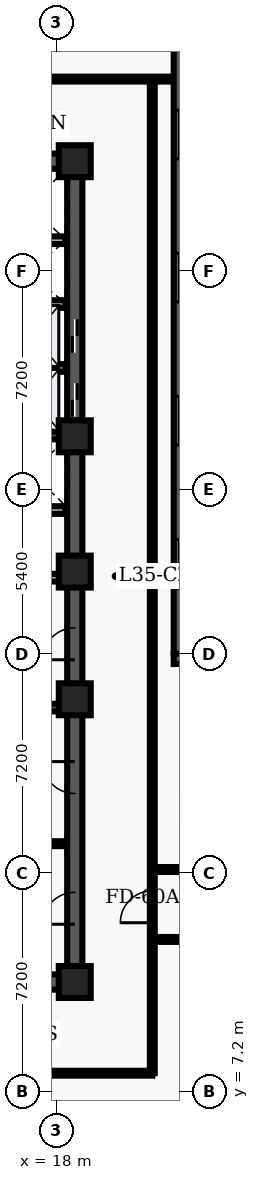
"""IFC4 building model, lengths in metres.
Left out: names, types, materials, properties, quantities, classifications, styles, units other than length and angle.
Written with IfcOpenShell. Run it as: python <this file> out.ifc"""

import sys

from ifc_helpers import new_model, entity, si_unit, converted_unit, direction, frame, origin_with_axes, origin_2d_with_axis, place, context, subcontext, project, spatial, polyline, rectangle, outline, extrude, element, fill, save


model = new_model("IFC4")
c1 = context("Model", 3, precision=1e-05, world=origin_with_axes(), true_north=direction((0.0, 1.0)))
c2 = subcontext(c1, "Body", "Model", "MODEL_VIEW")
j1 = project(units=[si_unit("LENGTHUNIT", "METRE"), converted_unit("PLANEANGLEUNIT", "DEGREE", entity("IfcPlaneAngleMeasure", 0.017), si_unit("PLANEANGLEUNIT", "RADIAN"), dimensions=[0, 0, 0, 0, 0, 0, 0])], contexts=[c1])
p1 = place(None, origin_with_axes())
s1 = spatial("IfcSite", under=j1, at=p1, CompositionType="ELEMENT")
p2 = place(p1, origin_with_axes())
s2 = spatial("IfcBuilding", under=s1, at=p2, CompositionType="ELEMENT")
p3 = place(p2, frame((0.0, 0.0, 144.6), z_axis=(0.0, 0.0, 1.0), x_axis=(1.0, 0.0, 0.0)))
s3 = spatial("IfcBuildingStorey", under=s2, at=p3, CompositionType="ELEMENT", Elevation=144.6)
p4 = place(p3, frame((11.4, 10.8, 0.0), z_axis=(0.0, 0.0, 1.0), x_axis=(1.0, 0.0, 0.0)))
e1 = element("IfcWall", 1, at=p4, inside=s3, PredefinedType="SHEAR", context=c2, shape_type="SweptSolid", body=[
    extrude(outline(polyline([(0.0, -0.25), (7.2, -0.25), (7.2, 0.25), (0.0, 0.25), (0.0, -0.25)])), origin_with_axes(), (0.0, 0.0, 1.0), 3.66),
])
p5 = place(p4, frame((2.625, 0.0, 0.0), z_axis=(0.0, 0.0, 1.0), x_axis=(1.0, 0.0, 0.0)))
e2 = element("IfcOpeningElement", 2, at=p5, cuts=e1, PredefinedType="OPENING", context=c2, shape_type="SweptSolid", body=[
    extrude(rectangle(XDim=1.05, YDim=0.52, at=origin_2d_with_axis()), origin_with_axes(), (0.0, 0.0, 1.0), 2.15),
])
p6 = place(p3, frame((11.4, 37.8, 0.0), z_axis=(0.0, 0.0, 1.0), x_axis=(1.0, 0.0, 0.0)))
e3 = element("IfcWall", 3, at=p6, inside=s3, PredefinedType="SHEAR", context=c2, shape_type="SweptSolid", body=[
    extrude(outline(polyline([(0.0, -0.25), (7.2, -0.25), (7.2, 0.25), (0.0, 0.25), (0.0, -0.25)])), origin_with_axes(), (0.0, 0.0, 1.0), 3.66),
])
p7 = place(p6, frame((2.625, 0.0, 0.0), z_axis=(0.0, 0.0, 1.0), x_axis=(1.0, 0.0, 0.0)))
e4 = element("IfcOpeningElement", 4, at=p7, cuts=e3, PredefinedType="OPENING", context=c2, shape_type="SweptSolid", body=[
    extrude(rectangle(XDim=1.05, YDim=0.52, at=origin_2d_with_axis()), origin_with_axes(), (0.0, 0.0, 1.0), 2.15),
])
p8 = place(p3, frame((18.6, 10.8, 0.0), z_axis=(0.0, 0.0, 1.0), x_axis=(0.0, 1.0, 0.0)))
e5 = element("IfcWall", 5, at=p8, inside=s3, PredefinedType="SHEAR", context=c2, shape_type="SweptSolid", body=[
    extrude(outline(polyline([(0.0, -0.25), (13.5, -0.25), (13.5, 0.25), (0.0, 0.25), (0.0, -0.25)])), origin_with_axes(), (0.0, 0.0, 1.0), 3.66),
])
p9 = place(p8, frame((11.125, 0.0, 0.0), z_axis=(0.0, 0.0, 1.0), x_axis=(1.0, 0.0, 0.0)))
e6 = element("IfcOpeningElement", 6, at=p9, cuts=e5, PredefinedType="OPENING", context=c2, shape_type="SweptSolid", body=[
    extrude(rectangle(XDim=1.05, YDim=0.52, at=origin_2d_with_axis()), origin_with_axes(), (0.0, 0.0, 1.0), 2.15),
])
p10 = place(p8, frame((2.425, 0.0, 0.0), z_axis=(0.0, 0.0, 1.0), x_axis=(1.0, 0.0, 0.0)))
e7 = element("IfcOpeningElement", 7, at=p10, cuts=e5, PredefinedType="OPENING", context=c2, shape_type="SweptSolid", body=[
    extrude(rectangle(XDim=1.05, YDim=0.52, at=origin_2d_with_axis()), origin_with_axes(), (0.0, 0.0, 1.0), 2.15),
])
p11 = place(p8, frame((6.725, 0.0, 0.0), z_axis=(0.0, 0.0, 1.0), x_axis=(1.0, 0.0, 0.0)))
e8 = element("IfcOpeningElement", 8, at=p11, cuts=e5, PredefinedType="OPENING", context=c2, shape_type="SweptSolid", body=[
    extrude(rectangle(XDim=1.05, YDim=0.52, at=origin_2d_with_axis()), origin_with_axes(), (0.0, 0.0, 1.0), 2.15),
])
p12 = place(p3, frame((18.6, 24.3, 0.0), z_axis=(0.0, 0.0, 1.0), x_axis=(0.0, 1.0, 0.0)))
e9 = element("IfcWall", 9, at=p12, inside=s3, PredefinedType="SHEAR", context=c2, shape_type="SweptSolid", body=[
    extrude(outline(polyline([(0.0, -0.25), (13.5, -0.25), (13.5, 0.25), (0.0, 0.25), (0.0, -0.25)])), origin_with_axes(), (0.0, 0.0, 1.0), 3.66),
])
p13 = place(p12, frame((5.65, 0.0, 0.0), z_axis=(0.0, 0.0, 1.0), x_axis=(1.0, 0.0, 0.0)))
e10 = element("IfcOpeningElement", 10, at=p13, cuts=e9, PredefinedType="OPENING", context=c2, shape_type="SweptSolid", body=[
    extrude(rectangle(XDim=1.1, YDim=0.52, at=origin_2d_with_axis()), origin_with_axes(), (0.0, 0.0, 1.0), 2.15),
])
p14 = place(p12, frame((7.75, 0.0, 0.0), z_axis=(0.0, 0.0, 1.0), x_axis=(1.0, 0.0, 0.0)))
e11 = element("IfcOpeningElement", 11, at=p14, cuts=e9, PredefinedType="OPENING", context=c2, shape_type="SweptSolid", body=[
    extrude(rectangle(XDim=1.1, YDim=0.52, at=origin_2d_with_axis()), origin_with_axes(), (0.0, 0.0, 1.0), 2.15),
])
for number, where, z_axis, x_axis in (
    (12, (11.65, 19.825, 0.0), (0.0, 0.0, 1.0), (1.0, 0.0, 0.0)),
    (13, (11.65, 28.775, 0.0), (0.0, 0.0, 1.0), (1.0, 0.0, 0.0)),
):
    element("IfcWall", number, at=place(p3, frame(where, z_axis=z_axis, x_axis=x_axis)), inside=s3, PredefinedType="SHEAR", context=c2, shape_type="SweptSolid", body=[
        extrude(outline(polyline([(0.0, -0.125), (6.7, -0.125), (6.7, 0.125), (0.0, 0.125), (0.0, -0.125)])), origin_with_axes(), (0.0, 0.0, 1.0), 3.66),
    ])
p15 = place(p3, frame((11.7, 24.1, 0.0), z_axis=(0.0, 0.0, 1.0), x_axis=(1.0, 0.0, 0.0)))
e14 = element("IfcWall", 14, at=p15, inside=s3, PredefinedType="SOLIDWALL", context=c2, shape_type="SweptSolid", body=[
    extrude(outline(polyline([(0.0, -0.125), (6.6, -0.125), (6.6, 0.125), (0.0, 0.125), (0.0, -0.125)])), origin_with_axes(), (0.0, 0.0, 1.0), 2.7),
])
p16 = place(p15, frame((3.6, 0.0, 0.0), z_axis=(0.0, 0.0, 1.0), x_axis=(1.0, 0.0, 0.0)))
e15 = element("IfcOpeningElement", 15, at=p16, cuts=e14, PredefinedType="OPENING", context=c2, shape_type="SweptSolid", body=[
    extrude(rectangle(XDim=0.9, YDim=0.27, at=origin_2d_with_axis()), origin_with_axes(), (0.0, 0.0, 1.0), 2.15),
])
p17 = place(p15, frame((5.65, 0.0, 0.0), z_axis=(0.0, 0.0, 1.0), x_axis=(1.0, 0.0, 0.0)))
e16 = element("IfcOpeningElement", 16, at=p17, cuts=e14, PredefinedType="OPENING", context=c2, shape_type="SweptSolid", body=[
    extrude(rectangle(XDim=0.9, YDim=0.27, at=origin_2d_with_axis()), origin_with_axes(), (0.0, 0.0, 1.0), 2.15),
])
p18 = place(p3, frame((11.7, 26.325, 0.0), z_axis=(0.0, 0.0, 1.0), x_axis=(1.0, 0.0, 0.0)))
e17 = element("IfcWall", 17, at=p18, inside=s3, PredefinedType="SOLIDWALL", context=c2, shape_type="SweptSolid", body=[
    extrude(outline(polyline([(0.0, -0.125), (6.6, -0.125), (6.6, 0.125), (0.0, 0.125), (0.0, -0.125)])), origin_with_axes(), (0.0, 0.0, 1.0), 2.7),
])
p19 = place(p18, frame((3.5, 0.0, 0.0), z_axis=(0.0, 0.0, 1.0), x_axis=(1.0, 0.0, 0.0)))
e18 = element("IfcOpeningElement", 18, at=p19, cuts=e17, PredefinedType="OPENING", context=c2, shape_type="SweptSolid", body=[
    extrude(rectangle(XDim=0.9, YDim=0.27, at=origin_2d_with_axis()), origin_with_axes(), (0.0, 0.0, 1.0), 2.15),
])
for number, where, z_axis, x_axis in (
    (19, (18.6, 10.8, 0.0), (0.0, 0.0, 1.0), (1.0, 0.0, 0.0)),
    (20, (18.6, 20.1, 0.0), (0.0, 0.0, 1.0), (1.0, 0.0, 0.0)),
    (21, (18.6, 24.3, 0.0), (0.0, 0.0, 1.0), (1.0, 0.0, 0.0)),
    (22, (18.6, 28.75, 0.0), (0.0, 0.0, 1.0), (1.0, 0.0, 0.0)),
    (23, (18.6, 37.8, 0.0), (0.0, 0.0, 1.0), (1.0, 0.0, 0.0)),
):
    element("IfcColumn", number, at=place(p3, frame(where, z_axis=z_axis, x_axis=x_axis)), inside=s3, PredefinedType="COLUMN", context=c2, shape_type="SweptSolid", body=[
        extrude(rectangle(XDim=1.05, YDim=1.05, at=origin_2d_with_axis()), origin_with_axes(), (0.0, 0.0, 1.0), 3.9),
    ])
p20 = place(p3, frame((15.84, 15.35, 0.0), z_axis=(0.0, 0.0, 1.0), x_axis=(1.0, 0.0, 0.0)))
e24 = element("IfcWall", 24, at=p20, inside=s3, PredefinedType="PARTITIONING", context=c2, shape_type="SweptSolid", body=[
    extrude(outline(polyline([(0.0, -0.08), (2.46, -0.08), (2.46, 0.08), (0.0, 0.08), (0.0, -0.08)])), origin_with_axes(), (0.0, 0.0, 1.0), 2.7),
])
for number, where, z_axis, x_axis in (
    (25, (15.84, 31.0, 0.0), (0.0, 0.0, 1.0), (1.0, 0.0, 0.0)),
    (26, (15.84, 33.1, 0.0), (0.0, 0.0, 1.0), (1.0, 0.0, 0.0)),
    (27, (15.84, 35.2, 0.0), (0.0, 0.0, 1.0), (1.0, 0.0, 0.0)),
):
    element("IfcWall", number, at=place(p3, frame(where, z_axis=z_axis, x_axis=x_axis)), inside=s3, PredefinedType="SOLIDWALL", context=c2, shape_type="SweptSolid", body=[
        extrude(outline(polyline([(0.0, -0.125), (2.46, -0.125), (2.46, 0.125), (0.0, 0.125), (0.0, -0.125)])), origin_with_axes(), (0.0, 0.0, 1.0), 2.7),
    ])
p21 = place(p3, frame((2.6, 7.8, 0.0), z_axis=(0.0, 0.0, 1.0), x_axis=(1.0, 0.0, 0.0)))
e28 = element("IfcWall", 28, at=p21, inside=s3, PredefinedType="PARTITIONING", context=c2, shape_type="SweptSolid", body=[
    extrude(outline(polyline([(0.0, -0.08), (18.55, -0.08), (18.55, 0.08), (0.0, 0.08), (0.0, -0.08)])), origin_with_axes(), (0.0, 0.0, 1.0), 2.7),
])
p22 = place(p21, frame((9.245, 0.0, 0.0), z_axis=(0.0, 0.0, 1.0), x_axis=(1.0, 0.0, 0.0)))
e29 = element("IfcOpeningElement", 29, at=p22, cuts=e28, PredefinedType="OPENING", context=c2, shape_type="SweptSolid", body=[
    extrude(rectangle(XDim=1.2, YDim=0.18, at=origin_2d_with_axis()), origin_with_axes(), (0.0, 0.0, 1.0), 2.2),
])
p23 = place(p3, frame((2.6, 40.5, 0.0), z_axis=(0.0, 0.0, 1.0), x_axis=(1.0, 0.0, 0.0)))
e30 = element("IfcWall", 30, at=p23, inside=s3, PredefinedType="PARTITIONING", context=c2, shape_type="SweptSolid", body=[
    extrude(outline(polyline([(0.0, -0.08), (19.26, -0.08), (19.26, 0.08), (0.0, 0.08), (0.0, -0.08)])), origin_with_axes(), (0.0, 0.0, 1.0), 2.7),
])
p24 = place(p23, frame((1.084, 0.0, 0.0), z_axis=(0.0, 0.0, 1.0), x_axis=(1.0, 0.0, 0.0)))
e31 = element("IfcOpeningElement", 31, at=p24, cuts=e30, PredefinedType="OPENING", context=c2, shape_type="SweptSolid", body=[
    extrude(rectangle(XDim=1.0, YDim=0.18, at=origin_2d_with_axis()), origin_with_axes(), (0.0, 0.0, 1.0), 2.15),
])
p25 = place(p23, frame((6.049, 0.0, 0.0), z_axis=(0.0, 0.0, 1.0), x_axis=(1.0, 0.0, 0.0)))
e32 = element("IfcOpeningElement", 32, at=p25, cuts=e30, PredefinedType="OPENING", context=c2, shape_type="SweptSolid", body=[
    extrude(rectangle(XDim=1.0, YDim=0.18, at=origin_2d_with_axis()), origin_with_axes(), (0.0, 0.0, 1.0), 2.15),
])
p26 = place(p23, frame((9.968, 0.0, 0.0), z_axis=(0.0, 0.0, 1.0), x_axis=(1.0, 0.0, 0.0)))
e33 = element("IfcOpeningElement", 33, at=p26, cuts=e30, PredefinedType="OPENING", context=c2, shape_type="SweptSolid", body=[
    extrude(rectangle(XDim=1.0, YDim=0.18, at=origin_2d_with_axis()), origin_with_axes(), (0.0, 0.0, 1.0), 2.15),
])
p27 = place(p23, frame((13.601, 0.0, 0.0), z_axis=(0.0, 0.0, 1.0), x_axis=(1.0, 0.0, 0.0)))
e34 = element("IfcOpeningElement", 34, at=p27, cuts=e30, PredefinedType="OPENING", context=c2, shape_type="SweptSolid", body=[
    extrude(rectangle(XDim=1.2, YDim=0.18, at=origin_2d_with_axis()), origin_with_axes(), (0.0, 0.0, 1.0), 2.2),
])
p28 = place(p3, frame((21.15, 7.8, 0.0), z_axis=(0.0, 0.0, 1.0), x_axis=(0.0, 1.0, 0.0)))
e35 = element("IfcWall", 35, at=p28, inside=s3, PredefinedType="PARTITIONING", context=c2, shape_type="SweptSolid", body=[
    extrude(outline(polyline([(0.0, -0.08), (32.7, -0.08), (32.7, 0.08), (0.0, 0.08), (0.0, -0.08)])), origin_with_axes(), (0.0, 0.0, 1.0), 2.7),
])
p29 = place(p28, frame((5.475, 0.0, 0.0), z_axis=(0.0, 0.0, 1.0), x_axis=(1.0, 0.0, 0.0)))
e36 = element("IfcOpeningElement", 36, at=p29, cuts=e35, PredefinedType="OPENING", context=c2, shape_type="SweptSolid", body=[
    extrude(rectangle(XDim=1.05, YDim=0.18, at=origin_2d_with_axis()), origin_with_axes(), (0.0, 0.0, 1.0), 2.15),
])
p30 = place(p3, frame((21.15, 12.2, 0.0), z_axis=(0.0, 0.0, 1.0), x_axis=(1.0, 0.0, 0.0)))
e37 = element("IfcWall", 37, at=p30, inside=s3, PredefinedType="PARTITIONING", context=c2, shape_type="SweptSolid", body=[
    extrude(outline(polyline([(0.0, -0.08), (15.2, -0.08), (15.2, 0.08), (0.0, 0.08), (0.0, -0.08)])), origin_with_axes(), (0.0, 0.0, 1.0), 2.7),
])
p31 = place(p30, frame((3.315, 0.0, 0.0), z_axis=(0.0, 0.0, 1.0), x_axis=(1.0, 0.0, 0.0)))
e38 = element("IfcOpeningElement", 38, at=p31, cuts=e37, PredefinedType="OPENING", context=c2, shape_type="SweptSolid", body=[
    extrude(rectangle(XDim=1.0, YDim=0.18, at=origin_2d_with_axis()), origin_with_axes(), (0.0, 0.0, 1.0), 2.15),
])
p32 = place(p30, frame((7.624, 0.0, 0.0), z_axis=(0.0, 0.0, 1.0), x_axis=(1.0, 0.0, 0.0)))
e39 = element("IfcOpeningElement", 39, at=p32, cuts=e37, PredefinedType="OPENING", context=c2, shape_type="SweptSolid", body=[
    extrude(rectangle(XDim=1.0, YDim=0.18, at=origin_2d_with_axis()), origin_with_axes(), (0.0, 0.0, 1.0), 2.15),
])
p33 = place(p30, frame((10.288, 0.0, 0.0), z_axis=(0.0, 0.0, 1.0), x_axis=(1.0, 0.0, 0.0)))
e40 = element("IfcOpeningElement", 40, at=p33, cuts=e37, PredefinedType="OPENING", context=c2, shape_type="SweptSolid", body=[
    extrude(rectangle(XDim=1.0, YDim=0.18, at=origin_2d_with_axis()), origin_with_axes(), (0.0, 0.0, 1.0), 2.15),
])
p34 = place(p30, frame((13.169, 0.0, 0.0), z_axis=(0.0, 0.0, 1.0), x_axis=(1.0, 0.0, 0.0)))
e41 = element("IfcOpeningElement", 41, at=p34, cuts=e37, PredefinedType="OPENING", context=c2, shape_type="SweptSolid", body=[
    extrude(rectangle(XDim=1.0, YDim=0.18, at=origin_2d_with_axis()), origin_with_axes(), (0.0, 0.0, 1.0), 2.15),
])
p35 = place(p3, frame((21.15, 14.5, 0.0), z_axis=(0.0, 0.0, 1.0), x_axis=(1.0, 0.0, 0.0)))
e42 = element("IfcWall", 42, at=p35, inside=s3, PredefinedType="PARTITIONING", context=c2, shape_type="SweptSolid", body=[
    extrude(outline(polyline([(0.0, -0.08), (15.2, -0.08), (15.2, 0.08), (0.0, 0.08), (0.0, -0.08)])), origin_with_axes(), (0.0, 0.0, 1.0), 2.7),
])
p36 = place(p35, frame((7.65, 0.0, 0.0), z_axis=(0.0, 0.0, 1.0), x_axis=(1.0, 0.0, 0.0)))
e43 = element("IfcOpeningElement", 43, at=p36, cuts=e42, PredefinedType="OPENING", context=c2, shape_type="SweptSolid", body=[
    extrude(rectangle(XDim=1.2, YDim=0.18, at=origin_2d_with_axis()), origin_with_axes(), (0.0, 0.0, 1.0), 2.2),
])
p37 = place(p3, frame((22.025, 46.34, 0.0), z_axis=(0.0, 0.0, 1.0), x_axis=(0.0, -1.0, 0.0)))
e44 = element("IfcWall", 44, at=p37, inside=s3, PredefinedType="SOLIDWALL", context=c2, shape_type="SweptSolid", body=[
    extrude(outline(polyline([(0.0, -0.17), (24.74, -0.17), (24.74, 0.17), (0.0, 0.17), (0.0, -0.17)])), origin_with_axes(), (0.0, 0.0, 1.0), 3.66),
])
p38 = place(p37, frame((2.954, 0.0, 0.45), z_axis=(0.0, 0.0, 1.0), x_axis=(1.0, 0.0, 0.0)))
e45 = element("IfcOpeningElement", 45, at=p38, cuts=e44, PredefinedType="OPENING", context=c2, shape_type="SweptSolid", body=[
    extrude(rectangle(XDim=1.6, YDim=0.36, at=origin_2d_with_axis()), origin_with_axes(), (0.0, 0.0, 1.0), 2.2),
])
p39 = place(p37, frame((7.662, 0.0, 0.45), z_axis=(0.0, 0.0, 1.0), x_axis=(1.0, 0.0, 0.0)))
e46 = element("IfcOpeningElement", 46, at=p39, cuts=e44, PredefinedType="OPENING", context=c2, shape_type="SweptSolid", body=[
    extrude(rectangle(XDim=1.6, YDim=0.36, at=origin_2d_with_axis()), origin_with_axes(), (0.0, 0.0, 1.0), 2.2),
])
p40 = place(p37, frame((12.37, 0.0, 0.45), z_axis=(0.0, 0.0, 1.0), x_axis=(1.0, 0.0, 0.0)))
e47 = element("IfcOpeningElement", 47, at=p40, cuts=e44, PredefinedType="OPENING", context=c2, shape_type="SweptSolid", body=[
    extrude(rectangle(XDim=1.6, YDim=0.36, at=origin_2d_with_axis()), origin_with_axes(), (0.0, 0.0, 1.0), 2.2),
])
p41 = place(p37, frame((17.078, 0.0, 0.45), z_axis=(0.0, 0.0, 1.0), x_axis=(1.0, 0.0, 0.0)))
e48 = element("IfcOpeningElement", 48, at=p41, cuts=e44, PredefinedType="OPENING", context=c2, shape_type="SweptSolid", body=[
    extrude(rectangle(XDim=1.6, YDim=0.36, at=origin_2d_with_axis()), origin_with_axes(), (0.0, 0.0, 1.0), 2.2),
])
p42 = place(p37, frame((21.786, 0.0, 0.45), z_axis=(0.0, 0.0, 1.0), x_axis=(1.0, 0.0, 0.0)))
e49 = element("IfcOpeningElement", 49, at=p42, cuts=e44, PredefinedType="OPENING", context=c2, shape_type="SweptSolid", body=[
    extrude(rectangle(XDim=1.6, YDim=0.36, at=origin_2d_with_axis()), origin_with_axes(), (0.0, 0.0, 1.0), 2.2),
])
p43 = place(p3, frame((21.855, 21.43, 0.0), z_axis=(0.0, 0.0, 1.0), x_axis=(1.0, 0.0, 0.0)))
e50 = element("IfcWall", 50, at=p43, inside=s3, PredefinedType="SOLIDWALL", context=c2, shape_type="SweptSolid", body=[
    extrude(outline(polyline([(0.0, -0.17), (16.545, -0.17), (16.545, 0.17), (0.0, 0.17), (0.0, -0.17)])), origin_with_axes(), (0.0, 0.0, 1.0), 3.66),
])
p44 = place(p43, frame((3.157, 0.0, 0.45), z_axis=(0.0, 0.0, 1.0), x_axis=(1.0, 0.0, 0.0)))
e51 = element("IfcOpeningElement", 51, at=p44, cuts=e50, PredefinedType="OPENING", context=c2, shape_type="SweptSolid", body=[
    extrude(rectangle(XDim=1.8, YDim=0.36, at=origin_2d_with_axis()), origin_with_axes(), (0.0, 0.0, 1.0), 2.1),
])
p45 = place(p43, frame((8.272, 0.0, 0.45), z_axis=(0.0, 0.0, 1.0), x_axis=(1.0, 0.0, 0.0)))
e52 = element("IfcOpeningElement", 52, at=p45, cuts=e50, PredefinedType="OPENING", context=c2, shape_type="SweptSolid", body=[
    extrude(rectangle(XDim=1.8, YDim=0.36, at=origin_2d_with_axis()), origin_with_axes(), (0.0, 0.0, 1.0), 2.1),
])
p46 = place(p43, frame((12.937, 0.0, 0.45), z_axis=(0.0, 0.0, 1.0), x_axis=(1.0, 0.0, 0.0)))
e53 = element("IfcOpeningElement", 53, at=p46, cuts=e50, PredefinedType="OPENING", context=c2, shape_type="SweptSolid", body=[
    extrude(rectangle(XDim=1.8, YDim=0.36, at=origin_2d_with_axis()), origin_with_axes(), (0.0, 0.0, 1.0), 2.1),
])
p47 = place(p12, frame((5.65, 0.0, 0.0), z_axis=(0.0, 0.0, 1.0), x_axis=(1.0, 0.0, 0.0)))
e54 = element("IfcDoor", 54, at=p47, inside=s3, OperationType="SLIDING_TO_LEFT", PredefinedType="DOOR", context=c2, shape_type="SweptSolid", body=[
    extrude(rectangle(XDim=1.1, YDim=0.09, at=origin_2d_with_axis()), origin_with_axes(), (0.0, 0.0, 1.0), 2.15),
])
fill(e10, e54)
p48 = place(p12, frame((7.75, 0.0, 0.0), z_axis=(0.0, 0.0, 1.0), x_axis=(1.0, 0.0, 0.0)))
e55 = element("IfcDoor", 55, at=p48, inside=s3, OperationType="SLIDING_TO_RIGHT", PredefinedType="DOOR", context=c2, shape_type="SweptSolid", body=[
    extrude(rectangle(XDim=1.1, YDim=0.09, at=origin_2d_with_axis()), origin_with_axes(), (0.0, 0.0, 1.0), 2.15),
])
fill(e11, e55)
p49 = place(p8, frame((11.125, 0.0, 0.0), z_axis=(0.0, 0.0, 1.0), x_axis=(1.0, 0.0, 0.0)))
e56 = element("IfcDoor", 56, at=p49, inside=s3, OperationType="SINGLE_SWING_LEFT", PredefinedType="DOOR", context=c2, shape_type="SweptSolid", body=[
    extrude(rectangle(XDim=1.05, YDim=0.09, at=origin_2d_with_axis()), origin_with_axes(), (0.0, 0.0, 1.0), 2.15),
])
fill(e6, e56)
p50 = place(p8, frame((2.425, 0.0, 0.0), z_axis=(0.0, 0.0, 1.0), x_axis=(1.0, 0.0, 0.0)))
e57 = element("IfcDoor", 57, at=p50, inside=s3, OperationType="SINGLE_SWING_LEFT", PredefinedType="DOOR", context=c2, shape_type="SweptSolid", body=[
    extrude(rectangle(XDim=1.05, YDim=0.09, at=origin_2d_with_axis()), origin_with_axes(), (0.0, 0.0, 1.0), 2.15),
])
fill(e7, e57)
p51 = place(p8, frame((6.725, 0.0, 0.0), z_axis=(0.0, 0.0, 1.0), x_axis=(1.0, 0.0, 0.0)))
e58 = element("IfcDoor", 58, at=p51, inside=s3, OperationType="SINGLE_SWING_RIGHT", PredefinedType="DOOR", context=c2, shape_type="SweptSolid", body=[
    extrude(rectangle(XDim=1.05, YDim=0.09, at=origin_2d_with_axis()), origin_with_axes(), (0.0, 0.0, 1.0), 2.15),
])
fill(e8, e58)
p52 = place(p28, frame((5.475, 0.0, 0.0), z_axis=(0.0, 0.0, 1.0), x_axis=(1.0, 0.0, 0.0)))
e59 = element("IfcDoor", 59, at=p52, inside=s3, OperationType="SINGLE_SWING_LEFT", PredefinedType="DOOR", context=c2, shape_type="SweptSolid", body=[
    extrude(rectangle(XDim=1.05, YDim=0.09, at=origin_2d_with_axis()), origin_with_axes(), (0.0, 0.0, 1.0), 2.15),
])
fill(e36, e59)
p53 = place(p37, frame((7.662, 0.0, 0.45), z_axis=(0.0, 0.0, 1.0), x_axis=(1.0, 0.0, 0.0)))
e60 = element("IfcWindow", 60, at=p53, inside=s3, PredefinedType="WINDOW", context=c2, shape_type="SweptSolid", body=[
    extrude(rectangle(XDim=1.6, YDim=0.09, at=origin_2d_with_axis()), origin_with_axes(), (0.0, 0.0, 1.0), 2.2),
])
fill(e46, e60)
p54 = place(p37, frame((12.37, 0.0, 0.45), z_axis=(0.0, 0.0, 1.0), x_axis=(1.0, 0.0, 0.0)))
e61 = element("IfcWindow", 61, at=p54, inside=s3, PredefinedType="WINDOW", context=c2, shape_type="SweptSolid", body=[
    extrude(rectangle(XDim=1.6, YDim=0.09, at=origin_2d_with_axis()), origin_with_axes(), (0.0, 0.0, 1.0), 2.2),
])
fill(e47, e61)
p55 = place(p37, frame((17.078, 0.0, 0.45), z_axis=(0.0, 0.0, 1.0), x_axis=(1.0, 0.0, 0.0)))
e62 = element("IfcWindow", 62, at=p55, inside=s3, PredefinedType="WINDOW", context=c2, shape_type="SweptSolid", body=[
    extrude(rectangle(XDim=1.6, YDim=0.09, at=origin_2d_with_axis()), origin_with_axes(), (0.0, 0.0, 1.0), 2.2),
])
fill(e48, e62)
p56 = place(p37, frame((21.786, 0.0, 0.45), z_axis=(0.0, 0.0, 1.0), x_axis=(1.0, 0.0, 0.0)))
e63 = element("IfcWindow", 63, at=p56, inside=s3, PredefinedType="WINDOW", context=c2, shape_type="SweptSolid", body=[
    extrude(rectangle(XDim=1.6, YDim=0.09, at=origin_2d_with_axis()), origin_with_axes(), (0.0, 0.0, 1.0), 2.2),
])
fill(e49, e63)
save(model, sys.argv[1])
